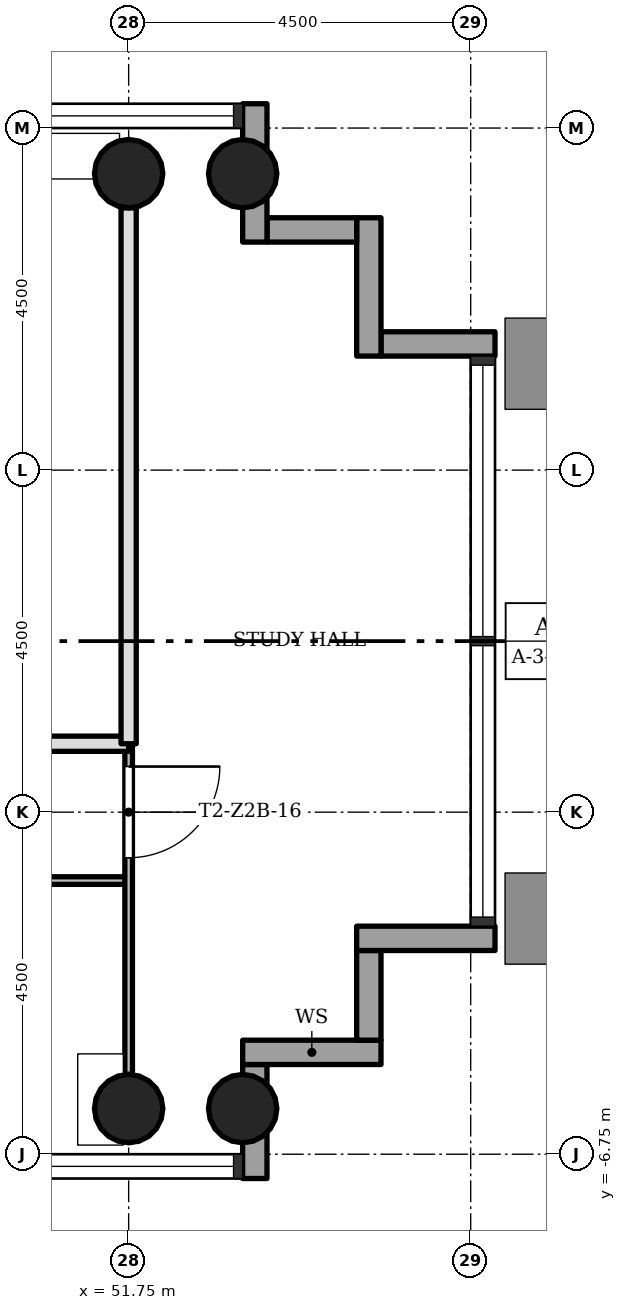
"""IFC4 building model, lengths in metres.
Left out: names, types, materials, properties, quantities, classifications, styles, units other than length and angle.
Written with IfcOpenShell. Run it as: python <this file> out.ifc"""

import sys

from ifc_helpers import new_model, si_unit, direction, frame, frame_2d, origin, origin_2d, place, context, subcontext, project, spatial, rectangle, hollow_circle, extrude, element, fill, save


model = new_model("IFC4")
c1 = context("Model", 3, precision=1e-05, world=origin(), true_north=direction((0.0, 1.0)))
c2 = subcontext(c1, "Body", "Model", "MODEL_VIEW")
j1 = project(units=[si_unit("LENGTHUNIT", "METRE"), si_unit("PLANEANGLEUNIT", "RADIAN")], contexts=[c1])
p1 = place(None, origin())
s1 = spatial("IfcSite", under=j1, at=p1, CompositionType="ELEMENT")
p2 = place(p1, origin())
s2 = spatial("IfcBuilding", under=s1, at=p2, CompositionType="ELEMENT")
p3 = place(p2, frame((0.0, 0.0, 80.0)))
s3 = spatial("IfcBuildingStorey", under=s2, at=p3, CompositionType="ELEMENT", Elevation=80.0)
for number, where, z_axis, x_axis in (
    (1, (51.75, -6.15, 0.0), (0.0, 0.0, 1.0), (1.0, 0.0, 0.0)),
    (2, (51.75, 6.15, 0.0), (0.0, 0.0, 1.0), (1.0, 0.0, 0.0)),
    (3, (53.25, -6.15, 0.0), (0.0, 0.0, 1.0), (1.0, 0.0, 0.0)),
    (4, (53.25, 6.15, 0.0), (0.0, 0.0, 1.0), (1.0, 0.0, 0.0)),
):
    element("IfcColumn", number, at=place(p3, frame(where, z_axis=z_axis, x_axis=x_axis)), inside=s3, PredefinedType="COLUMN", context=c2, shape_type="SweptSolid", body=[
        extrude(hollow_circle(Radius=0.45, WallThickness=0.032, at=origin_2d()), origin(), (0.0, 0.0, 1.0), 3.4),
    ])
p4 = place(p3, frame((53.41, -7.07, -0.3), z_axis=(0.0, 0.0, 1.0), x_axis=(0.0, 1.0, 0.0)))
e5 = element("IfcWall", 5, at=p4, inside=s3, PredefinedType="STANDARD", context=c2, shape_type="SweptSolid", body=[
    extrude(rectangle(XDim=1.5, YDim=0.32, at=frame_2d((0.75, 0.0))), origin(), (0.0, 0.0, 1.0), 3.4),
])
p5 = place(p3, frame((53.25, -5.41, -0.3), z_axis=(0.0, 0.0, 1.0), x_axis=(1.0, 0.0, 0.0)))
e6 = element("IfcWall", 6, at=p5, inside=s3, PredefinedType="STANDARD", context=c2, shape_type="SweptSolid", body=[
    extrude(rectangle(XDim=1.82, YDim=0.32, at=frame_2d((0.91, 0.0))), origin(), (0.0, 0.0, 1.0), 3.4),
])
p6 = place(p3, frame((54.91, -5.25, -0.3), z_axis=(0.0, 0.0, 1.0), x_axis=(0.0, 1.0, 0.0)))
e7 = element("IfcWall", 7, at=p6, inside=s3, PredefinedType="STANDARD", context=c2, shape_type="SweptSolid", body=[
    extrude(rectangle(XDim=1.18, YDim=0.32, at=frame_2d((0.59, 0.0))), origin(), (0.0, 0.0, 1.0), 3.4),
])
p7 = place(p3, frame((54.75, -3.91, -0.3), z_axis=(0.0, 0.0, 1.0), x_axis=(1.0, 0.0, 0.0)))
e8 = element("IfcWall", 8, at=p7, inside=s3, PredefinedType="STANDARD", context=c2, shape_type="SweptSolid", body=[
    extrude(rectangle(XDim=1.82, YDim=0.32, at=frame_2d((0.91, 0.0))), origin(), (0.0, 0.0, 1.0), 3.4),
])
p8 = place(p3, frame((56.57, 3.91, -0.3), z_axis=(0.0, 0.0, 1.0), x_axis=(-1.0, 0.0, 0.0)))
e9 = element("IfcWall", 9, at=p8, inside=s3, PredefinedType="STANDARD", context=c2, shape_type="SweptSolid", body=[
    extrude(rectangle(XDim=1.5, YDim=0.32, at=frame_2d((0.75, 0.0))), origin(), (0.0, 0.0, 1.0), 3.4),
])
p9 = place(p3, frame((54.91, 3.75, -0.3), z_axis=(0.0, 0.0, 1.0), x_axis=(0.0, 1.0, 0.0)))
e10 = element("IfcWall", 10, at=p9, inside=s3, PredefinedType="STANDARD", context=c2, shape_type="SweptSolid", body=[
    extrude(rectangle(XDim=1.82, YDim=0.32, at=frame_2d((0.91, 0.0))), origin(), (0.0, 0.0, 1.0), 3.4),
])
p10 = place(p3, frame((54.75, 5.41, -0.3), z_axis=(0.0, 0.0, 1.0), x_axis=(-1.0, 0.0, 0.0)))
e11 = element("IfcWall", 11, at=p10, inside=s3, PredefinedType="STANDARD", context=c2, shape_type="SweptSolid", body=[
    extrude(rectangle(XDim=1.18, YDim=0.32, at=frame_2d((0.59, 0.0))), origin(), (0.0, 0.0, 1.0), 3.4),
])
p11 = place(p3, frame((53.41, 5.25, -0.3), z_axis=(0.0, 0.0, 1.0), x_axis=(0.0, 1.0, 0.0)))
e12 = element("IfcWall", 12, at=p11, inside=s3, PredefinedType="STANDARD", context=c2, shape_type="SweptSolid", body=[
    extrude(rectangle(XDim=1.82, YDim=0.32, at=frame_2d((0.91, 0.0))), origin(), (0.0, 0.0, 1.0), 3.4),
])
p12 = place(p3, frame((51.75, -3.15, 0.0), z_axis=(0.0, 0.0, 1.0), x_axis=(-1.0, 0.0, 0.0)))
e13 = element("IfcWall", 13, at=p12, inside=s3, PredefinedType="PARTITIONING", context=c2, shape_type="SweptSolid", body=[
    extrude(rectangle(XDim=9.0, YDim=0.1, at=frame_2d((4.5, 0.0))), origin(), (0.0, 0.0, 1.0), 3.0),
])
p13 = place(p12, frame((5.55, 0.0, 0.0)))
e14 = element("IfcOpeningElement", 14, at=p13, cuts=e13, PredefinedType="OPENING", context=c2, shape_type="SweptSolid", body=[
    extrude(rectangle(XDim=0.9, YDim=2.1, at=frame_2d((0.45, 1.05))), frame((0.0, 0.06, 0.0), z_axis=(0.0, -1.0, 0.0), x_axis=(1.0, 0.0, 0.0)), (0.0, 0.0, 1.0), 0.12),
])
p14 = place(p3, frame((51.75, -1.35, 0.0), z_axis=(0.0, 0.0, 1.0), x_axis=(-1.0, 0.0, 0.0)))
e15 = element("IfcWall", 15, at=p14, inside=s3, PredefinedType="SOLIDWALL", context=c2, shape_type="SweptSolid", body=[
    extrude(rectangle(XDim=7.2, YDim=0.2, at=frame_2d((3.6, 0.0))), origin(), (0.0, 0.0, 1.0), 3.0),
])
p15 = place(p14, frame((1.95, 0.0, 0.0)))
e16 = element("IfcOpeningElement", 16, at=p15, cuts=e15, PredefinedType="OPENING", context=c2, shape_type="SweptSolid", body=[
    extrude(rectangle(XDim=0.9, YDim=2.1, at=frame_2d((0.45, 1.05))), frame((0.0, 0.11, 0.0), z_axis=(0.0, -1.0, 0.0), x_axis=(1.0, 0.0, 0.0)), (0.0, 0.0, 1.0), 0.22),
])
p16 = place(p3, frame((51.75, -5.7, 0.0), z_axis=(0.0, 0.0, 1.0), x_axis=(0.0, 1.0, 0.0)))
e17 = element("IfcWall", 17, at=p16, inside=s3, PredefinedType="PARTITIONING", context=c2, shape_type="SweptSolid", body=[
    extrude(rectangle(XDim=4.35, YDim=0.1, at=frame_2d((2.175, 0.0))), origin(), (0.0, 0.0, 1.0), 3.0),
])
p17 = place(p16, frame((2.85, 0.0, 0.0)))
e18 = element("IfcOpeningElement", 18, at=p17, cuts=e17, PredefinedType="OPENING", context=c2, shape_type="SweptSolid", body=[
    extrude(rectangle(XDim=1.2, YDim=2.1, at=frame_2d((0.6, 1.05))), frame((0.0, 0.06, 0.0), z_axis=(0.0, -1.0, 0.0), x_axis=(1.0, 0.0, 0.0)), (0.0, 0.0, 1.0), 0.12),
])
p18 = place(p3, frame((51.75, -1.35, 0.0), z_axis=(0.0, 0.0, 1.0), x_axis=(0.0, 1.0, 0.0)))
e19 = element("IfcWall", 19, at=p18, inside=s3, PredefinedType="SOLIDWALL", context=c2, shape_type="SweptSolid", body=[
    extrude(rectangle(XDim=7.05, YDim=0.2, at=frame_2d((3.525, 0.0))), origin(), (0.0, 0.0, 1.0), 3.0),
])
p19 = place(p17, origin())
e20 = element("IfcDoor", 20, at=p19, inside=s3, OperationType="SINGLE_SWING_RIGHT", PredefinedType="DOOR", context=c2, shape_type="SweptSolid", body=[
    extrude(rectangle(XDim=1.2, YDim=2.1, at=frame_2d((0.6, 1.05))), frame((0.0, 0.025, 0.0), z_axis=(0.0, -1.0, 0.0), x_axis=(1.0, 0.0, 0.0)), (0.0, 0.0, 1.0), 0.05),
])
fill(e18, e20)
save(model, sys.argv[1])
